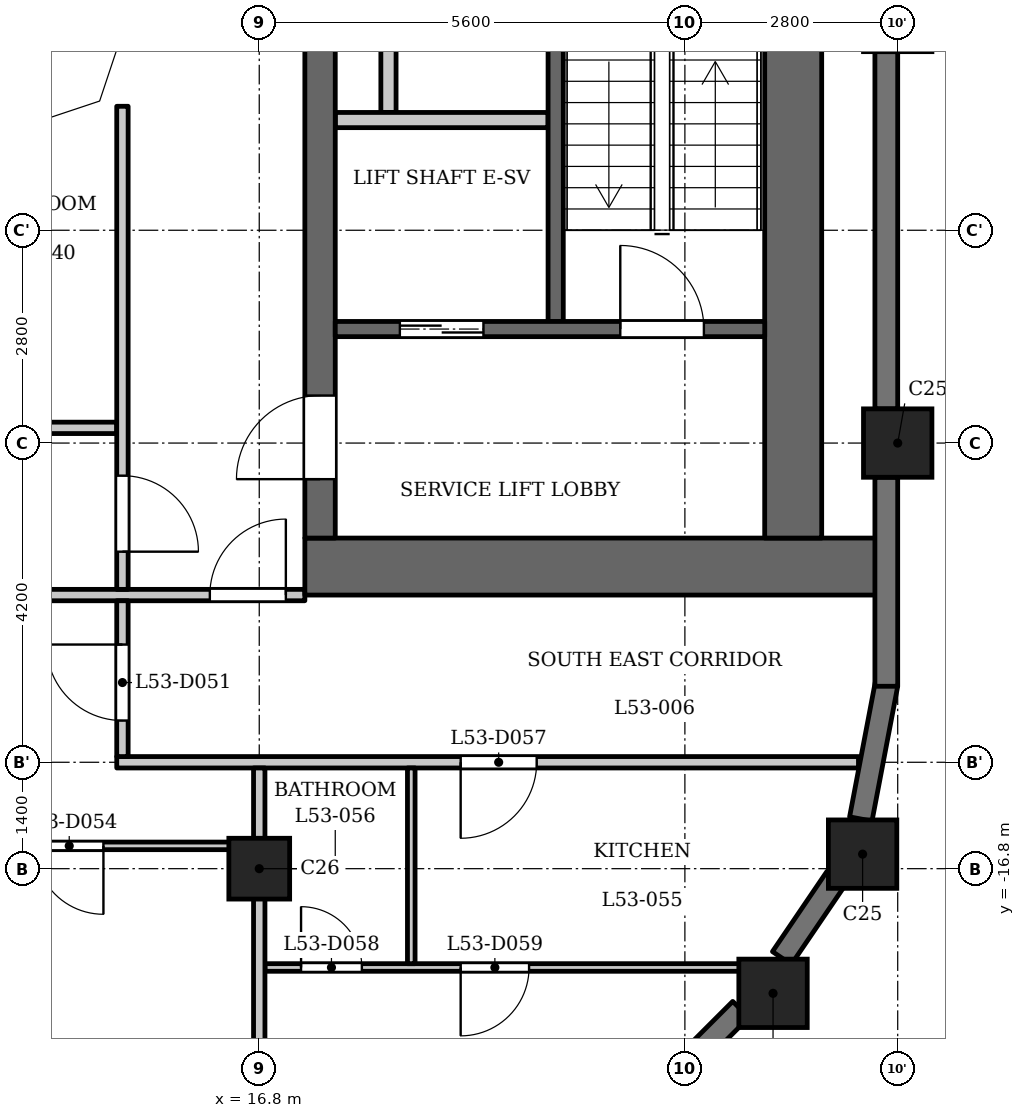
"""IFC4 building model, lengths in metres.
Left out: names, types, materials, properties, quantities, classifications, styles, units other than length and angle.
Written with IfcOpenShell. Run it as: python <this file> out.ifc"""

import sys

from ifc_helpers import new_model, si_unit, direction, frame, frame_2d, origin, origin_2d, place, context, subcontext, project, spatial, polyline, rectangle, outline, extrude, element, fill, save


model = new_model("IFC4")
c1 = context("Model", 3, precision=1e-05, world=origin(), true_north=direction((0.0, 1.0)))
c2 = subcontext(c1, "Body", "Model", "MODEL_VIEW")
j1 = project(units=[si_unit("LENGTHUNIT", "METRE"), si_unit("PLANEANGLEUNIT", "RADIAN")], contexts=[c1])
p1 = place(None, origin())
s1 = spatial("IfcSite", under=j1, at=p1, CompositionType="ELEMENT")
p2 = place(p1, origin())
s2 = spatial("IfcBuilding", under=s1, at=p2, CompositionType="ELEMENT")
p3 = place(p2, frame((0.0, 0.0, 206.4)))
s3 = spatial("IfcBuildingStorey", under=s2, at=p3, CompositionType="ELEMENT", Elevation=206.4)
for number, where, z_axis, x_axis in (
    (1, (23.56, -18.44, 0.0), (0.0, 0.0, 1.0), (1.0, 0.0, 0.0)),
    (2, (24.738, -16.609, 0.0), (0.0, 0.0, 1.0), (1.0, 0.0, 0.0)),
    (3, (25.2, -11.2, 0.0), (0.0, 0.0, 1.0), (1.0, 0.0, 0.0)),
):
    element("IfcColumn", number, at=place(p3, frame(where, z_axis=z_axis, x_axis=x_axis)), inside=s3, PredefinedType="COLUMN", context=c2, shape_type="SweptSolid", body=[
        extrude(rectangle(XDim=0.9, YDim=0.9, at=origin_2d()), origin(), (0.0, 0.0, 1.0), 3.5),
    ])
p4 = place(p3, frame((16.8, -16.8, 0.0), z_axis=(0.0, 0.0, 1.0), x_axis=(1.0, 0.0, 0.0)))
e4 = element("IfcColumn", 4, at=p4, inside=s3, PredefinedType="COLUMN", context=c2, shape_type="SweptSolid", body=[
    extrude(rectangle(XDim=0.8, YDim=0.8, at=origin_2d()), origin(), (0.0, 0.0, 1.0), 3.5),
])
p5 = place(p3, frame((21.191, -20.597, 0.0), z_axis=(0.0, 0.0, 1.0), x_axis=(0.707106781187, 0.707106781187, 0.0)))
e5 = element("IfcWall", 5, at=p5, inside=s3, PredefinedType="SOLIDWALL", context=c2, shape_type="SweptSolid", body=[
    extrude(rectangle(XDim=2.75, YDim=0.3, at=frame_2d((1.375, 0.0))), origin(), (0.0, 0.0, 1.0), 2.5),
])
p6 = place(p5, frame((0.775, 0.0, 0.6)))
e6 = element("IfcOpeningElement", 6, at=p6, cuts=e5, PredefinedType="OPENING", context=c2, shape_type="SweptSolid", body=[
    extrude(rectangle(XDim=1.2, YDim=1.55, at=frame_2d((0.6, 0.775))), frame((0.0, 0.16, 0.0), z_axis=(0.0, -1.0, 0.0), x_axis=(1.0, 0.0, 0.0)), (0.0, 0.0, 1.0), 0.32),
])
p7 = place(p3, frame((23.676, -17.975, 0.0), z_axis=(0.0, 0.0, 1.0), x_axis=(0.56200149592, 0.827136215253, 0.0)))
e7 = element("IfcWall", 7, at=p7, inside=s3, PredefinedType="SOLIDWALL", context=c2, shape_type="SweptSolid", body=[
    extrude(rectangle(XDim=1.277, YDim=0.3, at=frame_2d((0.639, 0.0))), origin(), (0.0, 0.0, 1.0), 2.5),
])
p8 = place(p3, frame((24.714, -16.146, 0.0), z_axis=(0.0, 0.0, 1.0), x_axis=(0.187348135549, 0.982293579388, 0.0)))
e8 = element("IfcWall", 8, at=p8, inside=s3, PredefinedType="SOLIDWALL", context=c2, shape_type="SweptSolid", body=[
    extrude(rectangle(XDim=1.806, YDim=0.3, at=frame_2d((0.903, 0.0))), origin(), (0.0, 0.0, 1.0), 2.5),
])
p9 = place(p3, frame((25.05, -14.4, 0.0), z_axis=(0.0, 0.0, 1.0), x_axis=(0.0, 1.0, 0.0)))
e9 = element("IfcWall", 9, at=p9, inside=s3, PredefinedType="SOLIDWALL", context=c2, shape_type="SweptSolid", body=[
    extrude(rectangle(XDim=2.75, YDim=0.3, at=frame_2d((1.375, 0.0))), origin(), (0.0, 0.0, 1.0), 2.5),
])
p10 = place(p3, frame((25.05, -10.75, 0.0), z_axis=(0.0, 0.0, 1.0), x_axis=(0.0, 1.0, 0.0)))
e10 = element("IfcWall", 10, at=p10, inside=s3, PredefinedType="SOLIDWALL", context=c2, shape_type="SweptSolid", body=[
    extrude(rectangle(XDim=4.7, YDim=0.3, at=frame_2d((2.35, 0.0))), origin(), (0.0, 0.0, 1.0), 2.5),
])
p11 = place(p3, frame((20.7, -9.6, 0.0), z_axis=(0.0, 0.0, 1.0), x_axis=(0.0, 1.0, 0.0)))
e11 = element("IfcWall", 11, at=p11, inside=s3, PredefinedType="SHEAR", context=c2, shape_type="SweptSolid", body=[
    extrude(rectangle(XDim=9.75, YDim=0.2, at=frame_2d((4.875, 0.0))), origin(), (0.0, 0.0, 1.0), 3.2),
])
p12 = place(p3, frame((17.4, -12.825, 0.0), z_axis=(0.0, 0.0, 1.0), x_axis=(1.0, 0.0, 0.0)))
e12 = element("IfcWall", 12, at=p12, inside=s3, PredefinedType="SHEAR", context=c2, shape_type="SweptSolid", body=[
    extrude(rectangle(XDim=7.6, YDim=0.75, at=frame_2d((3.8, 0.0))), origin(), (0.0, 0.0, 1.0), 3.2),
])
p13 = place(p3, frame((18.5, -6.85, 0.0), z_axis=(0.0, 0.0, 1.0), x_axis=(0.0, 1.0, 0.0)))
e13 = element("IfcWall", 13, at=p13, inside=s3, PredefinedType="PARTITIONING", context=c2, shape_type="SweptSolid", body=[
    extrude(rectangle(XDim=7.0, YDim=0.2, at=frame_2d((3.5, 0.0))), origin(), (0.0, 0.0, 1.0), 3.2),
])
p14 = place(p3, frame((17.6, -12.45, 0.0), z_axis=(0.0, 0.0, 1.0), x_axis=(0.0, 1.0, 0.0)))
e14 = element("IfcWall", 14, at=p14, inside=s3, PredefinedType="SHEAR", context=c2, shape_type="SweptSolid", body=[
    extrude(rectangle(XDim=24.9, YDim=0.4, at=frame_2d((12.45, 0.0))), origin(), (0.0, 0.0, 1.0), 3.2),
])
p15 = place(p14, frame((8.65, 0.0, 0.0)))
e15 = element("IfcOpeningElement", 15, at=p15, cuts=e14, PredefinedType="OPENING", context=c2, shape_type="SweptSolid", body=[
    extrude(rectangle(XDim=0.9, YDim=2.1, at=frame_2d((0.45, 1.05))), frame((0.0, 0.21, 0.0), z_axis=(0.0, -1.0, 0.0), x_axis=(1.0, 0.0, 0.0)), (0.0, 0.0, 1.0), 0.42),
])
p16 = place(p14, frame((15.6, 0.0, 0.0)))
e16 = element("IfcOpeningElement", 16, at=p16, cuts=e14, PredefinedType="OPENING", context=c2, shape_type="SweptSolid", body=[
    extrude(rectangle(XDim=1.1, YDim=2.1, at=frame_2d((0.55, 1.05))), frame((0.0, 0.21, 0.0), z_axis=(0.0, -1.0, 0.0), x_axis=(1.0, 0.0, 0.0)), (0.0, 0.0, 1.0), 0.42),
])
p17 = place(p14, frame((18.0, 0.0, 0.0)))
e17 = element("IfcOpeningElement", 17, at=p17, cuts=e14, PredefinedType="OPENING", context=c2, shape_type="SweptSolid", body=[
    extrude(rectangle(XDim=1.1, YDim=2.1, at=frame_2d((0.55, 1.05))), frame((0.0, 0.21, 0.0), z_axis=(0.0, -1.0, 0.0), x_axis=(1.0, 0.0, 0.0)), (0.0, 0.0, 1.0), 0.42),
])
p18 = place(p14, frame((23.025, 0.0, 0.0)))
e18 = element("IfcOpeningElement", 18, at=p18, cuts=e14, PredefinedType="OPENING", context=c2, shape_type="SweptSolid", body=[
    extrude(rectangle(XDim=1.1, YDim=2.1, at=frame_2d((0.55, 1.05))), frame((0.0, 0.21, 0.0), z_axis=(0.0, -1.0, 0.0), x_axis=(1.0, 0.0, 0.0)), (0.0, 0.0, 1.0), 0.42),
])
p19 = place(p14, frame((0.775, 0.0, 0.0)))
e19 = element("IfcOpeningElement", 19, at=p19, cuts=e14, PredefinedType="OPENING", context=c2, shape_type="SweptSolid", body=[
    extrude(rectangle(XDim=1.1, YDim=2.1, at=frame_2d((0.55, 1.05))), frame((0.0, 0.21, 0.0), z_axis=(0.0, -1.0, 0.0), x_axis=(1.0, 0.0, 0.0)), (0.0, 0.0, 1.0), 0.42),
])
p20 = place(p14, frame((12.925, 0.0, 0.0)))
e20 = element("IfcOpeningElement", 20, at=p20, cuts=e14, PredefinedType="OPENING", context=c2, shape_type="SweptSolid", body=[
    extrude(rectangle(XDim=1.8, YDim=2.1, at=frame_2d((0.9, 1.05))), frame((0.0, 0.21, 0.0), z_axis=(0.0, -1.0, 0.0), x_axis=(1.0, 0.0, 0.0)), (0.0, 0.0, 1.0), 0.42),
])
p21 = place(p3, frame((23.825, -12.45, 0.0), z_axis=(0.0, 0.0, 1.0), x_axis=(0.0, 1.0, 0.0)))
e21 = element("IfcWall", 21, at=p21, inside=s3, PredefinedType="SHEAR", context=c2, shape_type="SweptSolid", body=[
    extrude(rectangle(XDim=24.9, YDim=0.75, at=frame_2d((12.45, 0.0))), origin(), (0.0, 0.0, 1.0), 3.2),
])
p22 = place(p3, frame((17.8, -9.7, 0.0), z_axis=(0.0, 0.0, 1.0), x_axis=(1.0, 0.0, 0.0)))
e22 = element("IfcWall", 22, at=p22, inside=s3, PredefinedType="SHEAR", context=c2, shape_type="SweptSolid", body=[
    extrude(rectangle(XDim=5.65, YDim=0.2, at=frame_2d((2.825, 0.0))), origin(), (0.0, 0.0, 1.0), 3.2),
])
p23 = place(p22, frame((0.85, 0.0, 0.0)))
e23 = element("IfcOpeningElement", 23, at=p23, cuts=e22, PredefinedType="OPENING", context=c2, shape_type="SweptSolid", body=[
    extrude(rectangle(XDim=1.1, YDim=2.1, at=frame_2d((0.55, 1.05))), frame((0.0, 0.11, 0.0), z_axis=(0.0, -1.0, 0.0), x_axis=(1.0, 0.0, 0.0)), (0.0, 0.0, 1.0), 0.22),
])
p24 = place(p22, frame((3.75, 0.0, 0.0)))
e24 = element("IfcOpeningElement", 24, at=p24, cuts=e22, PredefinedType="OPENING", context=c2, shape_type="SweptSolid", body=[
    extrude(rectangle(XDim=1.1, YDim=2.1, at=frame_2d((0.55, 1.05))), frame((0.0, 0.11, 0.0), z_axis=(0.0, -1.0, 0.0), x_axis=(1.0, 0.0, 0.0)), (0.0, 0.0, 1.0), 0.22),
])
p25 = place(p3, frame((17.8, -6.95, 0.0), z_axis=(0.0, 0.0, 1.0), x_axis=(1.0, 0.0, 0.0)))
e25 = element("IfcWall", 25, at=p25, inside=s3, PredefinedType="PARTITIONING", context=c2, shape_type="SweptSolid", body=[
    extrude(rectangle(XDim=2.8, YDim=0.2, at=frame_2d((1.4, 0.0))), origin(), (0.0, 0.0, 1.0), 3.2),
])
p26 = place(p3, frame((16.875, -18.1, 0.0), z_axis=(0.0, 0.0, 1.0), x_axis=(1.0, 0.0, 0.0)))
e26 = element("IfcWall", 26, at=p26, inside=s3, PredefinedType="PARTITIONING", context=c2, shape_type="SweptSolid", body=[
    extrude(rectangle(XDim=6.765, YDim=0.1, at=frame_2d((3.382, 0.0))), origin(), (0.0, 0.0, 1.0), 3.2),
])
p27 = place(p26, frame((0.475, 0.0, 0.0)))
e27 = element("IfcOpeningElement", 27, at=p27, cuts=e26, PredefinedType="OPENING", context=c2, shape_type="SweptSolid", body=[
    extrude(rectangle(XDim=0.8, YDim=2.1, at=frame_2d((0.4, 1.05))), frame((0.0, 0.06, 0.0), z_axis=(0.0, -1.0, 0.0), x_axis=(1.0, 0.0, 0.0)), (0.0, 0.0, 1.0), 0.12),
])
p28 = place(p26, frame((2.575, 0.0, 0.0)))
e28 = element("IfcOpeningElement", 28, at=p28, cuts=e26, PredefinedType="OPENING", context=c2, shape_type="SweptSolid", body=[
    extrude(rectangle(XDim=0.9, YDim=2.1, at=frame_2d((0.45, 1.05))), frame((0.0, 0.06, 0.0), z_axis=(0.0, -1.0, 0.0), x_axis=(1.0, 0.0, 0.0)), (0.0, 0.0, 1.0), 0.12),
])
p29 = place(p3, frame((-16.725, -16.5, 0.0), z_axis=(0.0, 0.0, 1.0), x_axis=(1.0, 0.0, 0.0)))
e29 = element("IfcWall", 29, at=p29, inside=s3, PredefinedType="PARTITIONING", context=c2, shape_type="SweptSolid", body=[
    extrude(rectangle(XDim=33.45, YDim=0.1, at=frame_2d((16.725, 0.0))), origin(), (0.0, 0.0, 1.0), 3.2),
])
p30 = place(p29, frame((4.075, 0.0, 0.0)))
e30 = element("IfcOpeningElement", 30, at=p30, cuts=e29, PredefinedType="OPENING", context=c2, shape_type="SweptSolid", body=[
    extrude(rectangle(XDim=0.9, YDim=2.1, at=frame_2d((0.45, 1.05))), frame((0.0, 0.06, 0.0), z_axis=(0.0, -1.0, 0.0), x_axis=(1.0, 0.0, 0.0)), (0.0, 0.0, 1.0), 0.12),
])
p31 = place(p29, frame((6.175, 0.0, 0.0)))
e31 = element("IfcOpeningElement", 31, at=p31, cuts=e29, PredefinedType="OPENING", context=c2, shape_type="SweptSolid", body=[
    extrude(rectangle(XDim=0.9, YDim=2.1, at=frame_2d((0.45, 1.05))), frame((0.0, 0.06, 0.0), z_axis=(0.0, -1.0, 0.0), x_axis=(1.0, 0.0, 0.0)), (0.0, 0.0, 1.0), 0.12),
])
p32 = place(p29, frame((30.575, 0.0, 0.0)))
e32 = element("IfcOpeningElement", 32, at=p32, cuts=e29, PredefinedType="OPENING", context=c2, shape_type="SweptSolid", body=[
    extrude(rectangle(XDim=0.9, YDim=2.1, at=frame_2d((0.45, 1.05))), frame((0.0, 0.06, 0.0), z_axis=(0.0, -1.0, 0.0), x_axis=(1.0, 0.0, 0.0)), (0.0, 0.0, 1.0), 0.12),
])
p33 = place(p29, frame((22.975, 0.0, 0.0)))
e33 = element("IfcOpeningElement", 33, at=p33, cuts=e29, PredefinedType="OPENING", context=c2, shape_type="SweptSolid", body=[
    extrude(rectangle(XDim=0.9, YDim=2.1, at=frame_2d((0.45, 1.05))), frame((0.0, 0.06, 0.0), z_axis=(0.0, -1.0, 0.0), x_axis=(1.0, 0.0, 0.0)), (0.0, 0.0, 1.0), 0.12),
])
p34 = place(p3, frame((14.925, -15.4, 0.0), z_axis=(0.0, 0.0, 1.0), x_axis=(1.0, 0.0, 0.0)))
e34 = element("IfcWall", 34, at=p34, inside=s3, PredefinedType="PARTITIONING", context=c2, shape_type="SweptSolid", body=[
    extrude(rectangle(XDim=9.759, YDim=0.15, at=frame_2d((4.879, 0.0))), origin(), (0.0, 0.0, 1.0), 3.2),
])
p35 = place(p34, frame((4.525, 0.0, 0.0)))
e35 = element("IfcOpeningElement", 35, at=p35, cuts=e34, PredefinedType="OPENING", context=c2, shape_type="SweptSolid", body=[
    extrude(rectangle(XDim=1.0, YDim=2.1, at=frame_2d((0.5, 1.05))), frame((0.0, 0.085, 0.0), z_axis=(0.0, -1.0, 0.0), x_axis=(1.0, 0.0, 0.0)), (0.0, 0.0, 1.0), 0.17),
])
p36 = place(p3, frame((-17.4, -13.2, 0.0), z_axis=(0.0, 0.0, 1.0), x_axis=(1.0, 0.0, 0.0)))
e36 = element("IfcWall", 36, at=p36, inside=s3, PredefinedType="PARTITIONING", context=c2, shape_type="SweptSolid", body=[
    extrude(rectangle(XDim=34.8, YDim=0.15, at=frame_2d((17.4, 0.0))), origin(), (0.0, 0.0, 1.0), 3.2),
])
p37 = place(p36, frame((0.15, 0.0, 0.0)))
e37 = element("IfcOpeningElement", 37, at=p37, cuts=e36, PredefinedType="OPENING", context=c2, shape_type="SweptSolid", body=[
    extrude(rectangle(XDim=1.0, YDim=2.1, at=frame_2d((0.5, 1.05))), frame((0.0, 0.085, 0.0), z_axis=(0.0, -1.0, 0.0), x_axis=(1.0, 0.0, 0.0)), (0.0, 0.0, 1.0), 0.17),
])
p38 = place(p36, frame((33.55, 0.0, 0.0)))
e38 = element("IfcOpeningElement", 38, at=p38, cuts=e36, PredefinedType="OPENING", context=c2, shape_type="SweptSolid", body=[
    extrude(rectangle(XDim=1.0, YDim=2.1, at=frame_2d((0.5, 1.05))), frame((0.0, 0.085, 0.0), z_axis=(0.0, -1.0, 0.0), x_axis=(1.0, 0.0, 0.0)), (0.0, 0.0, 1.0), 0.17),
])
p39 = place(p3, frame((-14.925, -11.0, 0.0), z_axis=(0.0, 0.0, 1.0), x_axis=(1.0, 0.0, 0.0)))
e39 = element("IfcWall", 39, at=p39, inside=s3, PredefinedType="PARTITIONING", context=c2, shape_type="SweptSolid", body=[
    extrude(rectangle(XDim=29.85, YDim=0.15, at=frame_2d((14.925, 0.0))), origin(), (0.0, 0.0, 1.0), 3.2),
])
p40 = place(p39, frame((2.575, 0.0, 0.0)))
e40 = element("IfcOpeningElement", 40, at=p40, cuts=e39, PredefinedType="OPENING", context=c2, shape_type="SweptSolid", body=[
    extrude(rectangle(XDim=1.0, YDim=2.1, at=frame_2d((0.5, 1.05))), frame((0.0, 0.085, 0.0), z_axis=(0.0, -1.0, 0.0), x_axis=(1.0, 0.0, 0.0)), (0.0, 0.0, 1.0), 0.17),
])
p41 = place(p39, frame((26.375, 0.0, 0.0)))
e41 = element("IfcOpeningElement", 41, at=p41, cuts=e39, PredefinedType="OPENING", context=c2, shape_type="SweptSolid", body=[
    extrude(rectangle(XDim=1.0, YDim=2.1, at=frame_2d((0.5, 1.05))), frame((0.0, 0.085, 0.0), z_axis=(0.0, -1.0, 0.0), x_axis=(1.0, 0.0, 0.0)), (0.0, 0.0, 1.0), 0.17),
])
p42 = place(p3, frame((15.0, -15.325, 0.0), z_axis=(0.0, 0.0, 1.0), x_axis=(0.0, 1.0, 0.0)))
e42 = element("IfcWall", 42, at=p42, inside=s3, PredefinedType="PARTITIONING", context=c2, shape_type="SweptSolid", body=[
    extrude(rectangle(XDim=2.05, YDim=0.15, at=frame_2d((1.025, 0.0))), origin(), (0.0, 0.0, 1.0), 3.2),
])
p43 = place(p42, frame((0.474, 0.0, 0.0)))
e43 = element("IfcOpeningElement", 43, at=p43, cuts=e42, PredefinedType="OPENING", context=c2, shape_type="SweptSolid", body=[
    extrude(rectangle(XDim=1.0, YDim=2.1, at=frame_2d((0.5, 1.05))), frame((0.0, 0.085, 0.0), z_axis=(0.0, -1.0, 0.0), x_axis=(1.0, 0.0, 0.0)), (0.0, 0.0, 1.0), 0.17),
])
p44 = place(p3, frame((15.0, -13.125, 0.0), z_axis=(0.0, 0.0, 1.0), x_axis=(0.0, 1.0, 0.0)))
e44 = element("IfcWall", 44, at=p44, inside=s3, PredefinedType="PARTITIONING", context=c2, shape_type="SweptSolid", body=[
    extrude(rectangle(XDim=6.356, YDim=0.15, at=frame_2d((3.178, 0.0))), origin(), (0.0, 0.0, 1.0), 3.2),
])
p45 = place(p44, frame((0.496, 0.0, 0.0)))
e45 = element("IfcOpeningElement", 45, at=p45, cuts=e44, PredefinedType="OPENING", context=c2, shape_type="SweptSolid", body=[
    extrude(rectangle(XDim=1.0, YDim=2.1, at=frame_2d((0.5, 1.05))), frame((0.0, 0.085, 0.0), z_axis=(0.0, -1.0, 0.0), x_axis=(1.0, 0.0, 0.0)), (0.0, 0.0, 1.0), 0.17),
])
p46 = place(p3, frame((16.8, -22.31, 0.0), z_axis=(0.0, 0.0, 1.0), x_axis=(0.0, 1.0, 0.0)))
e46 = element("IfcWall", 46, at=p46, inside=s3, PredefinedType="PARTITIONING", context=c2, shape_type="SweptSolid", body=[
    extrude(rectangle(XDim=6.835, YDim=0.15, at=frame_2d((3.417, 0.0))), origin(), (0.0, 0.0, 1.0), 2.55),
])
p47 = place(p3, frame((18.8, -18.05, 0.0), z_axis=(0.0, 0.0, 1.0), x_axis=(0.0, 1.0, 0.0)))
e47 = element("IfcWall", 47, at=p47, inside=s3, PredefinedType="PARTITIONING", context=c2, shape_type="SweptSolid", body=[
    extrude(rectangle(XDim=2.575, YDim=0.1, at=frame_2d((1.288, 0.0))), origin(), (0.0, 0.0, 1.0), 3.2),
])
p48 = place(p3, origin())
e48 = element("IfcWall", 48, at=p48, inside=s3, PredefinedType="SOLIDWALL", context=c2, shape_type="SweptSolid", body=[
    extrude(outline(polyline([(14.937, -6.937), (15.3, -5.849), (15.3, -5.8), (15.0, -5.8), (14.7, -6.7), (13.8, -7.0), (13.8, -7.3), (13.849, -7.3), (14.937, -6.937)])), origin(), (0.0, 0.0, 1.0), 3.2),
])
p49 = place(p23, origin())
e49 = element("IfcDoor", 49, at=p49, inside=s3, OperationType="DOUBLE_DOOR_SLIDING", PredefinedType="DOOR", context=c2, shape_type="SweptSolid", body=[
    extrude(rectangle(XDim=1.1, YDim=2.1, at=frame_2d((0.55, 1.05))), frame((0.0, 0.025, 0.0), z_axis=(0.0, -1.0, 0.0), x_axis=(1.0, 0.0, 0.0)), (0.0, 0.0, 1.0), 0.05),
])
fill(e23, e49)
p50 = place(p19, origin())
e50 = element("IfcDoor", 50, at=p50, inside=s3, OperationType="SINGLE_SWING_RIGHT", PredefinedType="DOOR", context=c2, shape_type="SweptSolid", body=[
    extrude(rectangle(XDim=1.1, YDim=2.1, at=frame_2d((0.55, 1.05))), frame((0.0, 0.025, 0.0), z_axis=(0.0, -1.0, 0.0), x_axis=(1.0, 0.0, 0.0)), (0.0, 0.0, 1.0), 0.05),
])
fill(e19, e50)
p51 = place(p24, origin())
e51 = element("IfcDoor", 51, at=p51, inside=s3, OperationType="SINGLE_SWING_RIGHT", PredefinedType="DOOR", context=c2, shape_type="SweptSolid", body=[
    extrude(rectangle(XDim=1.1, YDim=2.1, at=frame_2d((0.55, 1.05))), frame((0.0, 0.025, 0.0), z_axis=(0.0, -1.0, 0.0), x_axis=(1.0, 0.0, 0.0)), (0.0, 0.0, 1.0), 0.05),
])
fill(e24, e51)
p52 = place(p45, origin())
e52 = element("IfcDoor", 52, at=p52, inside=s3, OperationType="SINGLE_SWING_LEFT", PredefinedType="DOOR", context=c2, shape_type="SweptSolid", body=[
    extrude(rectangle(XDim=1.0, YDim=2.1, at=frame_2d((0.5, 1.05))), frame((0.0, 0.025, 0.0), z_axis=(0.0, -1.0, 0.0), x_axis=(1.0, 0.0, 0.0)), (0.0, 0.0, 1.0), 0.05),
])
fill(e45, e52)
p53 = place(p38, origin())
e53 = element("IfcDoor", 53, at=p53, inside=s3, OperationType="SINGLE_SWING_LEFT", PredefinedType="DOOR", context=c2, shape_type="SweptSolid", body=[
    extrude(rectangle(XDim=1.0, YDim=2.1, at=frame_2d((0.5, 1.05))), frame((0.0, 0.025, 0.0), z_axis=(0.0, -1.0, 0.0), x_axis=(1.0, 0.0, 0.0)), (0.0, 0.0, 1.0), 0.05),
])
fill(e38, e53)
p54 = place(p43, origin())
e54 = element("IfcDoor", 54, at=p54, inside=s3, OperationType="SINGLE_SWING_LEFT", PredefinedType="DOOR", context=c2, shape_type="SweptSolid", body=[
    extrude(rectangle(XDim=1.0, YDim=2.1, at=frame_2d((0.5, 1.05))), frame((0.0, 0.025, 0.0), z_axis=(0.0, -1.0, 0.0), x_axis=(1.0, 0.0, 0.0)), (0.0, 0.0, 1.0), 0.05),
])
fill(e43, e54)
p55 = place(p32, origin())
e55 = element("IfcDoor", 55, at=p55, inside=s3, OperationType="SINGLE_SWING_RIGHT", PredefinedType="DOOR", context=c2, shape_type="SweptSolid", body=[
    extrude(rectangle(XDim=0.9, YDim=2.1, at=frame_2d((0.45, 1.05))), frame((0.0, 0.025, 0.0), z_axis=(0.0, -1.0, 0.0), x_axis=(1.0, 0.0, 0.0)), (0.0, 0.0, 1.0), 0.05),
])
fill(e32, e55)
p56 = place(p35, origin())
e56 = element("IfcDoor", 56, at=p56, inside=s3, OperationType="SINGLE_SWING_LEFT", PredefinedType="DOOR", context=c2, shape_type="SweptSolid", body=[
    extrude(rectangle(XDim=1.0, YDim=2.1, at=frame_2d((0.5, 1.05))), frame((0.0, 0.025, 0.0), z_axis=(0.0, -1.0, 0.0), x_axis=(1.0, 0.0, 0.0)), (0.0, 0.0, 1.0), 0.05),
])
fill(e35, e56)
p57 = place(p27, origin())
e57 = element("IfcDoor", 57, at=p57, inside=s3, OperationType="SINGLE_SWING_RIGHT", PredefinedType="DOOR", context=c2, shape_type="SweptSolid", body=[
    extrude(rectangle(XDim=0.8, YDim=2.1, at=frame_2d((0.4, 1.05))), frame((0.0, 0.025, 0.0), z_axis=(0.0, -1.0, 0.0), x_axis=(1.0, 0.0, 0.0)), (0.0, 0.0, 1.0), 0.05),
])
fill(e27, e57)
p58 = place(p28, origin())
e58 = element("IfcDoor", 58, at=p58, inside=s3, OperationType="SINGLE_SWING_LEFT", PredefinedType="DOOR", context=c2, shape_type="SweptSolid", body=[
    extrude(rectangle(XDim=0.9, YDim=2.1, at=frame_2d((0.45, 1.05))), frame((0.0, 0.025, 0.0), z_axis=(0.0, -1.0, 0.0), x_axis=(1.0, 0.0, 0.0)), (0.0, 0.0, 1.0), 0.05),
])
fill(e28, e58)
save(model, sys.argv[1])
